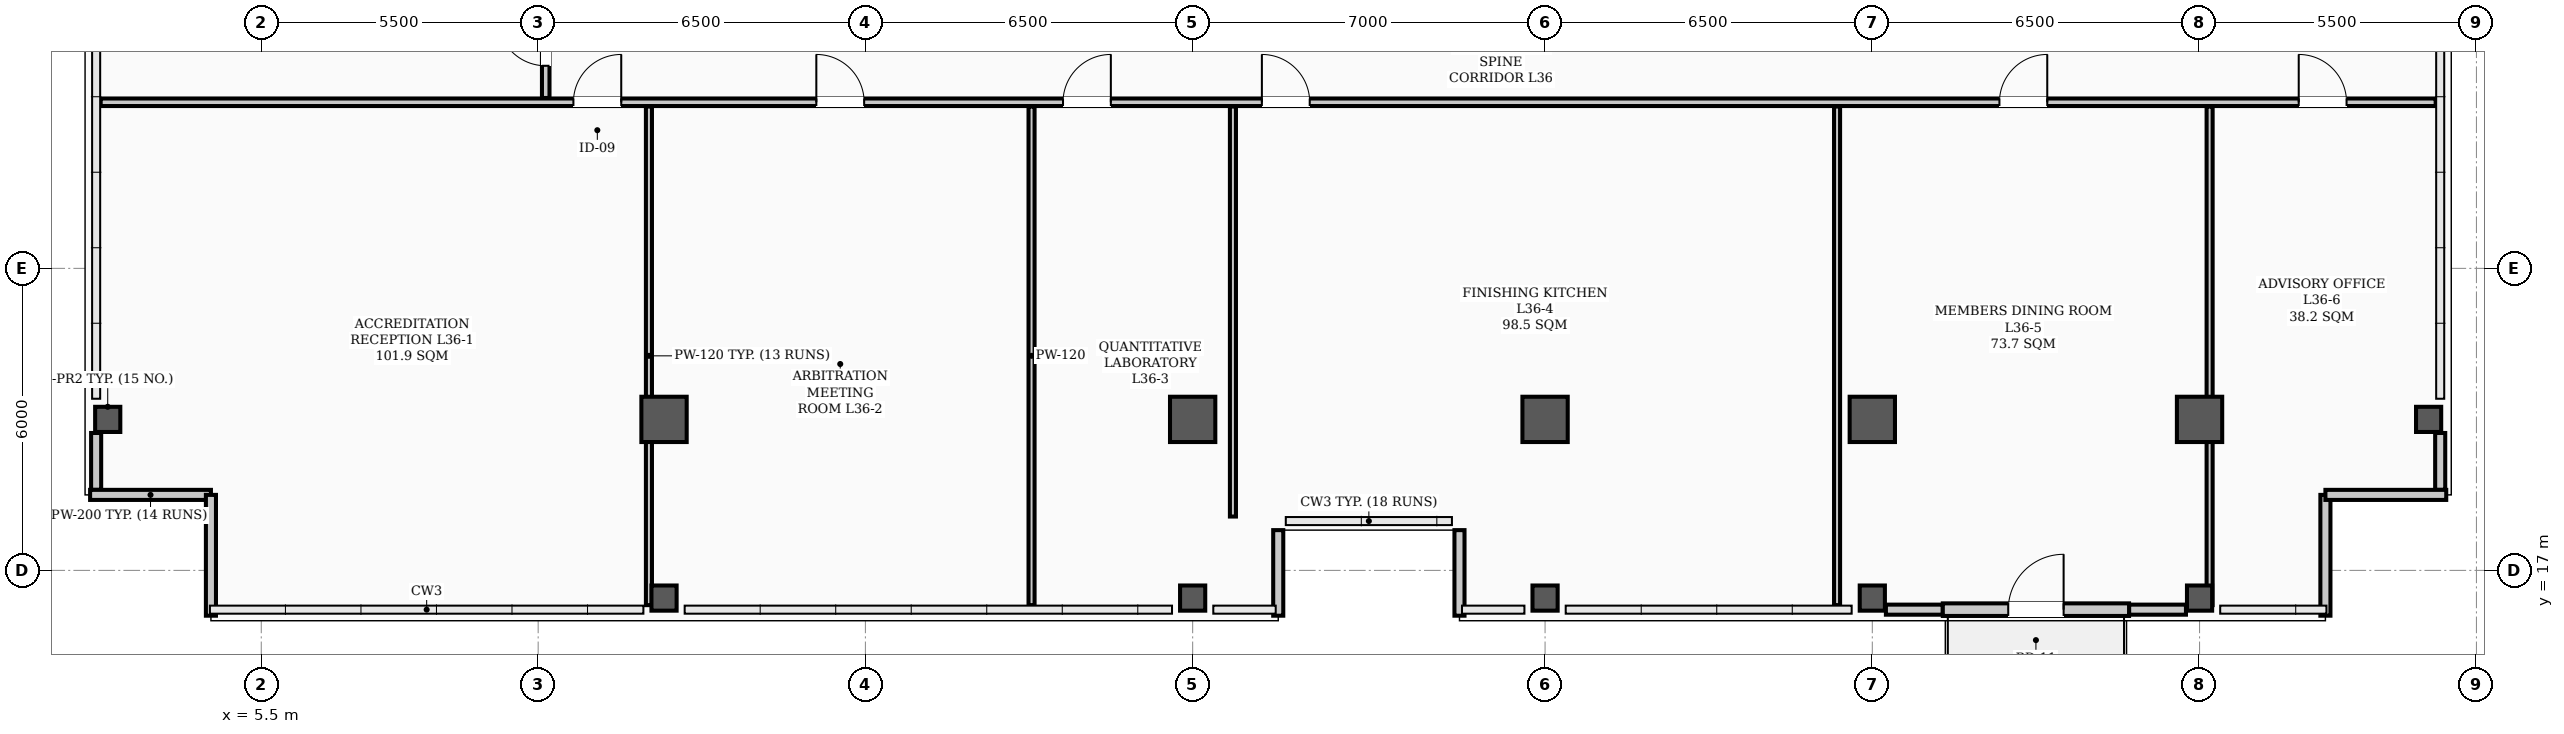
"""IFC4 building model, lengths in metres.
Left out: names, types, materials, properties, quantities, classifications, styles, units other than length and angle.
Written with IfcOpenShell. Run it as: python <this file> out.ifc"""

import sys

from ifc_helpers import new_model, si_unit, direction, frame, frame_2d, origin, origin_2d, place, context, subcontext, project, spatial, rectangle, hollow_rectangle, extrude, element, fill, save


model = new_model("IFC4")
c1 = context("Model", 3, precision=1e-05, world=origin(), true_north=direction((0.0, 1.0)))
c2 = subcontext(c1, "Body", "Model", "MODEL_VIEW")
j1 = project(units=[si_unit("LENGTHUNIT", "METRE"), si_unit("PLANEANGLEUNIT", "RADIAN")], contexts=[c1])
p1 = place(None, origin())
s1 = spatial("IfcSite", under=j1, at=p1, CompositionType="ELEMENT")
p2 = place(p1, origin())
s2 = spatial("IfcBuilding", under=s1, at=p2, CompositionType="ELEMENT")
p3 = place(p2, frame((0.0, 0.0, 146.1)))
s3 = spatial("IfcBuildingStorey", under=s2, at=p3, CompositionType="ELEMENT", Elevation=146.1)
for number, where, z_axis, x_axis in (
    (1, (13.5, 20.0, 0.0), (0.0, 0.0, 1.0), (1.0, 0.0, 0.0)),
    (2, (24.0, 20.0, 0.0), (0.0, 0.0, 1.0), (1.0, 0.0, 0.0)),
    (3, (31.0, 20.0, 0.0), (0.0, 0.0, 1.0), (1.0, 0.0, 0.0)),
    (4, (37.5, 20.0, 0.0), (0.0, 0.0, 1.0), (1.0, 0.0, 0.0)),
    (5, (44.0, 20.0, 0.0), (0.0, 0.0, 1.0), (1.0, 0.0, 0.0)),
):
    element("IfcColumn", number, at=place(p3, frame(where, z_axis=z_axis, x_axis=x_axis)), inside=s3, PredefinedType="COLUMN", context=c2, shape_type="SweptSolid", body=[
        extrude(hollow_rectangle(XDim=0.9, YDim=0.9, WallThickness=0.035, InnerFilletRadius=0.017, OuterFilletRadius=0.052, at=origin_2d()), origin(), (0.0, 0.0, 1.0), 3.9),
    ])
for number, where, z_axis, x_axis in (
    (6, (2.45, 20.0, 0.0), (0.0, 0.0, 1.0), (1.0, 0.0, 0.0)),
    (7, (13.5, 16.45, 0.0), (0.0, 0.0, 1.0), (1.0, 0.0, 0.0)),
    (8, (24.0, 16.45, 0.0), (0.0, 0.0, 1.0), (1.0, 0.0, 0.0)),
    (9, (31.0, 16.45, 0.0), (0.0, 0.0, 1.0), (1.0, 0.0, 0.0)),
    (10, (37.5, 16.45, 0.0), (0.0, 0.0, 1.0), (1.0, 0.0, 0.0)),
    (11, (44.0, 16.45, 0.0), (0.0, 0.0, 1.0), (1.0, 0.0, 0.0)),
    (12, (48.55, 20.0, 0.0), (0.0, 0.0, 1.0), (1.0, 0.0, 0.0)),
):
    element("IfcColumn", number, at=place(p3, frame(where, z_axis=z_axis, x_axis=x_axis)), inside=s3, PredefinedType="COLUMN", context=c2, shape_type="SweptSolid", body=[
        extrude(hollow_rectangle(XDim=0.5, YDim=0.5, WallThickness=0.024, InnerFilletRadius=0.012, OuterFilletRadius=0.036, at=origin_2d()), origin(), (0.0, 0.0, 1.0), 3.9),
    ])
for number, where, z_axis, x_axis in (
    (13, (2.22, 18.6, 0.0), (0.0, 0.0, 1.0), (0.0, 1.0, 0.0)),
    (14, (48.78, 18.6, 0.0), (0.0, 0.0, 1.0), (0.0, 1.0, 0.0)),
    (15, (37.77, 16.22, 0.0), (0.0, 0.0, 1.0), (1.0, 0.0, 0.0)),
    (16, (42.6, 16.22, 0.0), (0.0, 0.0, 1.0), (1.0, 0.0, 0.0)),
):
    element("IfcWall", number, at=place(p3, frame(where, z_axis=z_axis, x_axis=x_axis)), inside=s3, PredefinedType="PARAPET", context=c2, shape_type="SweptSolid", body=[
        extrude(rectangle(XDim=1.13, YDim=0.2, at=frame_2d((0.565, 0.0))), origin(), (0.0, 0.0, 1.0), 1.2),
    ])
for number, where, z_axis, x_axis in (
    (17, (2.1, 18.5, 0.0), (0.0, 0.0, 1.0), (1.0, 0.0, 0.0)),
    (18, (4.5, 18.5, 0.0), (0.0, 0.0, 1.0), (0.0, -1.0, 0.0)),
    (19, (46.5, 16.1, 0.0), (0.0, 0.0, 1.0), (0.0, 1.0, 0.0)),
    (20, (46.5, 18.5, 0.0), (0.0, 0.0, 1.0), (1.0, 0.0, 0.0)),
):
    element("IfcWall", number, at=place(p3, frame(where, z_axis=z_axis, x_axis=x_axis)), inside=s3, PredefinedType="PARAPET", context=c2, shape_type="SweptSolid", body=[
        extrude(rectangle(XDim=2.4, YDim=0.2, at=frame_2d((1.2, 0.0))), origin(), (0.0, 0.0, 1.0), 1.2),
    ])
for number, where, z_axis, x_axis in (
    (21, (25.7, 16.1, 0.0), (0.0, 0.0, 1.0), (0.0, 1.0, 0.0)),
    (22, (29.3, 17.8, 0.0), (0.0, 0.0, 1.0), (0.0, -1.0, 0.0)),
):
    element("IfcWall", number, at=place(p3, frame(where, z_axis=z_axis, x_axis=x_axis)), inside=s3, PredefinedType="PARAPET", context=c2, shape_type="SweptSolid", body=[
        extrude(rectangle(XDim=1.7, YDim=0.2, at=frame_2d((0.85, 0.0))), origin(), (0.0, 0.0, 1.0), 1.2),
    ])
p4 = place(p3, frame((38.9, 16.22, 0.0), z_axis=(0.0, 0.0, 1.0), x_axis=(1.0, 0.0, 0.0)))
e23 = element("IfcWall", 23, at=p4, inside=s3, PredefinedType="STANDARD", context=c2, shape_type="SweptSolid", body=[
    extrude(rectangle(XDim=3.7, YDim=0.25, at=frame_2d((1.85, 0.0))), origin(), (0.0, 0.0, 1.0), 3.18),
])
p5 = place(p4, frame((1.3, 0.0, 0.0)))
e24 = element("IfcOpeningElement", 24, at=p5, cuts=e23, PredefinedType="OPENING", context=c2, shape_type="SweptSolid", body=[
    extrude(rectangle(XDim=1.1, YDim=2.2, at=frame_2d((0.55, 1.1))), frame((0.0, 0.135, 0.0), z_axis=(0.0, -1.0, 0.0), x_axis=(1.0, 0.0, 0.0)), (0.0, 0.0, 1.0), 0.27),
])
p6 = place(p3, frame((2.31, 26.3, 0.0), z_axis=(0.0, 0.0, 1.0), x_axis=(1.0, 0.0, 0.0)))
e25 = element("IfcWall", 25, at=p6, inside=s3, PredefinedType="PARTITIONING", context=c2, shape_type="SweptSolid", body=[
    extrude(rectangle(XDim=46.38, YDim=0.15, at=frame_2d((23.19, 0.0))), origin(), (0.0, 0.0, 1.0), 3.2),
])
p7 = place(p6, frame((9.39, 0.0, 0.0)))
e26 = element("IfcOpeningElement", 26, at=p7, cuts=e25, PredefinedType="OPENING", context=c2, shape_type="SweptSolid", body=[
    extrude(rectangle(XDim=0.95, YDim=2.08, at=frame_2d((0.475, 1.04))), frame((0.0, 0.085, 0.0), z_axis=(0.0, -1.0, 0.0), x_axis=(1.0, 0.0, 0.0)), (0.0, 0.0, 1.0), 0.17),
])
p8 = place(p6, frame((14.215, 0.0, 0.0)))
e27 = element("IfcOpeningElement", 27, at=p8, cuts=e25, PredefinedType="OPENING", context=c2, shape_type="SweptSolid", body=[
    extrude(rectangle(XDim=0.95, YDim=2.08, at=frame_2d((0.475, 1.04))), frame((0.0, 0.085, 0.0), z_axis=(0.0, -1.0, 0.0), x_axis=(1.0, 0.0, 0.0)), (0.0, 0.0, 1.0), 0.17),
])
p9 = place(p6, frame((19.115, 0.0, 0.0)))
e28 = element("IfcOpeningElement", 28, at=p9, cuts=e25, PredefinedType="OPENING", context=c2, shape_type="SweptSolid", body=[
    extrude(rectangle(XDim=0.95, YDim=2.08, at=frame_2d((0.475, 1.04))), frame((0.0, 0.085, 0.0), z_axis=(0.0, -1.0, 0.0), x_axis=(1.0, 0.0, 0.0)), (0.0, 0.0, 1.0), 0.17),
])
p10 = place(p6, frame((23.065, 0.0, 0.0)))
e29 = element("IfcOpeningElement", 29, at=p10, cuts=e25, PredefinedType="OPENING", context=c2, shape_type="SweptSolid", body=[
    extrude(rectangle(XDim=0.95, YDim=2.08, at=frame_2d((0.475, 1.04))), frame((0.0, 0.085, 0.0), z_axis=(0.0, -1.0, 0.0), x_axis=(1.0, 0.0, 0.0)), (0.0, 0.0, 1.0), 0.17),
])
p11 = place(p6, frame((37.715, 0.0, 0.0)))
e30 = element("IfcOpeningElement", 30, at=p11, cuts=e25, PredefinedType="OPENING", context=c2, shape_type="SweptSolid", body=[
    extrude(rectangle(XDim=0.95, YDim=2.08, at=frame_2d((0.475, 1.04))), frame((0.0, 0.085, 0.0), z_axis=(0.0, -1.0, 0.0), x_axis=(1.0, 0.0, 0.0)), (0.0, 0.0, 1.0), 0.17),
])
p12 = place(p6, frame((43.66, 0.0, 0.0)))
e31 = element("IfcOpeningElement", 31, at=p12, cuts=e25, PredefinedType="OPENING", context=c2, shape_type="SweptSolid", body=[
    extrude(rectangle(XDim=0.95, YDim=2.08, at=frame_2d((0.475, 1.04))), frame((0.0, 0.085, 0.0), z_axis=(0.0, -1.0, 0.0), x_axis=(1.0, 0.0, 0.0)), (0.0, 0.0, 1.0), 0.17),
])
p13 = place(p3, frame((11.15, 26.385, 0.0), z_axis=(0.0, 0.0, 1.0), x_axis=(0.0, 1.0, 0.0)))
e32 = element("IfcWall", 32, at=p13, inside=s3, PredefinedType="PARTITIONING", context=c2, shape_type="SweptSolid", body=[
    extrude(rectangle(XDim=13.58, YDim=0.15, at=frame_2d((6.79, 0.0))), origin(), (0.0, 0.0, 1.0), 3.1),
])
p14 = place(p13, frame((0.64, 0.0, 0.0)))
e33 = element("IfcOpeningElement", 33, at=p14, cuts=e32, PredefinedType="OPENING", context=c2, shape_type="SweptSolid", body=[
    extrude(rectangle(XDim=0.95, YDim=2.08, at=frame_2d((0.475, 1.04))), frame((0.0, 0.085, 0.0), z_axis=(0.0, -1.0, 0.0), x_axis=(1.0, 0.0, 0.0)), (0.0, 0.0, 1.0), 0.17),
])
p15 = place(p13, frame((6.94, 0.0, 0.0)))
e34 = element("IfcOpeningElement", 34, at=p15, cuts=e32, PredefinedType="OPENING", context=c2, shape_type="SweptSolid", body=[
    extrude(rectangle(XDim=0.95, YDim=2.08, at=frame_2d((0.475, 1.04))), frame((0.0, 0.085, 0.0), z_axis=(0.0, -1.0, 0.0), x_axis=(1.0, 0.0, 0.0)), (0.0, 0.0, 1.0), 0.17),
])
p16 = place(p13, frame((11.065, 0.0, 0.0)))
e35 = element("IfcOpeningElement", 35, at=p16, cuts=e32, PredefinedType="OPENING", context=c2, shape_type="SweptSolid", body=[
    extrude(rectangle(XDim=0.95, YDim=2.08, at=frame_2d((0.475, 1.04))), frame((0.0, 0.085, 0.0), z_axis=(0.0, -1.0, 0.0), x_axis=(1.0, 0.0, 0.0)), (0.0, 0.0, 1.0), 0.17),
])
for number, where, z_axis, x_axis in (
    (36, (13.2, 16.31, 0.0), (0.0, 0.0, 1.0), (0.0, 1.0, 0.0)),
    (37, (20.8, 16.31, 0.0), (0.0, 0.0, 1.0), (0.0, 1.0, 0.0)),
):
    element("IfcWall", number, at=place(p3, frame(where, z_axis=z_axis, x_axis=x_axis)), inside=s3, PredefinedType="PARTITIONING", context=c2, shape_type="SweptSolid", body=[
        extrude(rectangle(XDim=9.905, YDim=0.12, at=frame_2d((4.953, 0.0))), origin(), (0.0, 0.0, 1.0), 3.1),
    ])
p17 = place(p3, frame((24.8, 18.07, 0.0), z_axis=(0.0, 0.0, 1.0), x_axis=(0.0, 1.0, 0.0)))
e38 = element("IfcWall", 38, at=p17, inside=s3, PredefinedType="PARTITIONING", context=c2, shape_type="SweptSolid", body=[
    extrude(rectangle(XDim=8.145, YDim=0.12, at=frame_2d((4.073, 0.0))), origin(), (0.0, 0.0, 1.0), 3.1),
])
for number, where, z_axis, x_axis in (
    (39, (36.8, 16.31, 0.0), (0.0, 0.0, 1.0), (0.0, 1.0, 0.0)),
    (40, (44.2, 16.31, 0.0), (0.0, 0.0, 1.0), (0.0, 1.0, 0.0)),
):
    element("IfcWall", number, at=place(p3, frame(where, z_axis=z_axis, x_axis=x_axis)), inside=s3, PredefinedType="PARTITIONING", context=c2, shape_type="SweptSolid", body=[
        extrude(rectangle(XDim=9.905, YDim=0.12, at=frame_2d((4.953, 0.0))), origin(), (0.0, 0.0, 1.0), 3.1),
    ])
p18 = place(p5, origin())
e41 = element("IfcDoor", 41, at=p18, inside=s3, OperationType="SINGLE_SWING_RIGHT", PredefinedType="DOOR", context=c2, shape_type="SweptSolid", body=[
    extrude(rectangle(XDim=1.1, YDim=2.2, at=frame_2d((0.55, 1.1))), frame((0.0, 0.025, 0.0), z_axis=(0.0, -1.0, 0.0), x_axis=(1.0, 0.0, 0.0)), (0.0, 0.0, 1.0), 0.05),
])
fill(e24, e41)
p19 = place(p7, origin())
e42 = element("IfcDoor", 42, at=p19, inside=s3, OperationType="SINGLE_SWING_RIGHT", PredefinedType="DOOR", context=c2, shape_type="SweptSolid", body=[
    extrude(rectangle(XDim=0.95, YDim=2.08, at=frame_2d((0.475, 1.04))), frame((0.0, 0.025, 0.0), z_axis=(0.0, -1.0, 0.0), x_axis=(1.0, 0.0, 0.0)), (0.0, 0.0, 1.0), 0.05),
])
fill(e26, e42)
p20 = place(p8, origin())
e43 = element("IfcDoor", 43, at=p20, inside=s3, OperationType="SINGLE_SWING_LEFT", PredefinedType="DOOR", context=c2, shape_type="SweptSolid", body=[
    extrude(rectangle(XDim=0.95, YDim=2.08, at=frame_2d((0.475, 1.04))), frame((0.0, 0.025, 0.0), z_axis=(0.0, -1.0, 0.0), x_axis=(1.0, 0.0, 0.0)), (0.0, 0.0, 1.0), 0.05),
])
fill(e27, e43)
p21 = place(p9, origin())
e44 = element("IfcDoor", 44, at=p21, inside=s3, OperationType="SINGLE_SWING_RIGHT", PredefinedType="DOOR", context=c2, shape_type="SweptSolid", body=[
    extrude(rectangle(XDim=0.95, YDim=2.08, at=frame_2d((0.475, 1.04))), frame((0.0, 0.025, 0.0), z_axis=(0.0, -1.0, 0.0), x_axis=(1.0, 0.0, 0.0)), (0.0, 0.0, 1.0), 0.05),
])
fill(e28, e44)
p22 = place(p10, origin())
e45 = element("IfcDoor", 45, at=p22, inside=s3, OperationType="SINGLE_SWING_LEFT", PredefinedType="DOOR", context=c2, shape_type="SweptSolid", body=[
    extrude(rectangle(XDim=0.95, YDim=2.08, at=frame_2d((0.475, 1.04))), frame((0.0, 0.025, 0.0), z_axis=(0.0, -1.0, 0.0), x_axis=(1.0, 0.0, 0.0)), (0.0, 0.0, 1.0), 0.05),
])
fill(e29, e45)
p23 = place(p11, origin())
e46 = element("IfcDoor", 46, at=p23, inside=s3, OperationType="SINGLE_SWING_RIGHT", PredefinedType="DOOR", context=c2, shape_type="SweptSolid", body=[
    extrude(rectangle(XDim=0.95, YDim=2.08, at=frame_2d((0.475, 1.04))), frame((0.0, 0.025, 0.0), z_axis=(0.0, -1.0, 0.0), x_axis=(1.0, 0.0, 0.0)), (0.0, 0.0, 1.0), 0.05),
])
fill(e30, e46)
p24 = place(p12, origin())
e47 = element("IfcDoor", 47, at=p24, inside=s3, OperationType="SINGLE_SWING_LEFT", PredefinedType="DOOR", context=c2, shape_type="SweptSolid", body=[
    extrude(rectangle(XDim=0.95, YDim=2.08, at=frame_2d((0.475, 1.04))), frame((0.0, 0.025, 0.0), z_axis=(0.0, -1.0, 0.0), x_axis=(1.0, 0.0, 0.0)), (0.0, 0.0, 1.0), 0.05),
])
fill(e31, e47)
p25 = place(p14, origin())
e48 = element("IfcDoor", 48, at=p25, inside=s3, OperationType="SINGLE_SWING_RIGHT", PredefinedType="DOOR", context=c2, shape_type="SweptSolid", body=[
    extrude(rectangle(XDim=0.95, YDim=2.08, at=frame_2d((0.475, 1.04))), frame((0.0, 0.025, 0.0), z_axis=(0.0, -1.0, 0.0), x_axis=(1.0, 0.0, 0.0)), (0.0, 0.0, 1.0), 0.05),
])
fill(e33, e48)
save(model, sys.argv[1])
